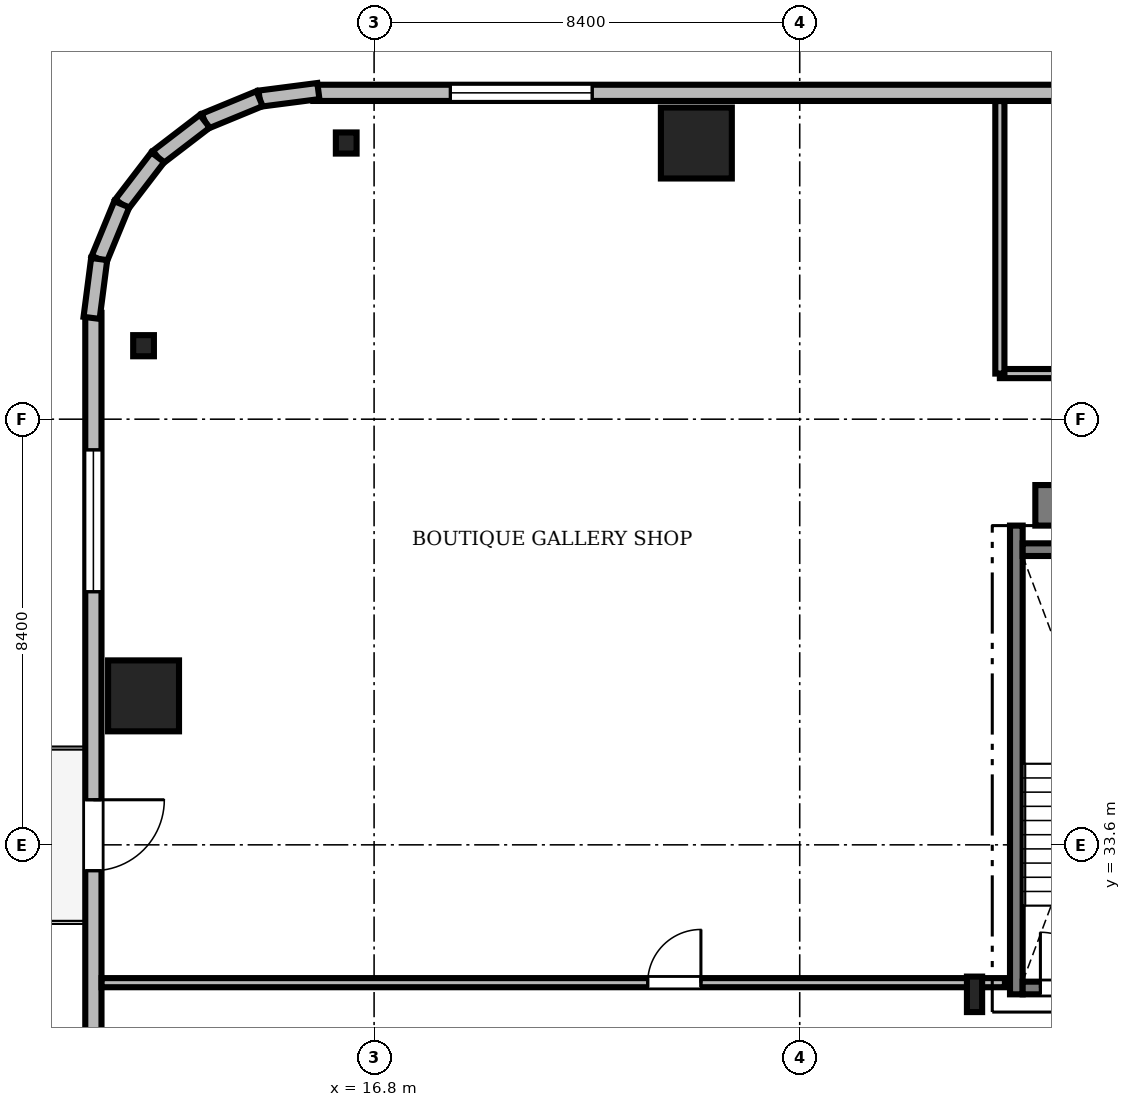
"""IFC4 building model, lengths in metres.
Left out: names, types, materials, properties, quantities, classifications, styles, units other than length and angle.
Written with IfcOpenShell. Run it as: python <this file> out.ifc"""

import sys

from ifc_helpers import new_model, si_unit, direction, frame, frame_2d, origin, origin_2d, place, context, subcontext, project, spatial, rectangle, i_section, extrude, source, transform, mapped, element, fill, save


model = new_model("IFC4")
c1 = context("Model", 3, precision=1e-05, world=origin(), true_north=direction((0.0, 1.0)))
c2 = subcontext(c1, "Body", "Model", "MODEL_VIEW")
j1 = project(units=[si_unit("LENGTHUNIT", "METRE"), si_unit("PLANEANGLEUNIT", "RADIAN")], contexts=[c1])
p1 = place(None, origin())
s1 = spatial("IfcSite", under=j1, at=p1, CompositionType="ELEMENT")
p2 = place(p1, origin())
s2 = spatial("IfcBuilding", under=s1, at=p2, CompositionType="ELEMENT")
p3 = place(p2, frame((0.0, 0.0, 226.05)))
s3 = spatial("IfcBuildingStorey", under=s2, at=p3, CompositionType="ELEMENT", Elevation=226.05)
m1 = source(origin(), c2, "Body", "SweptSolid", [
    extrude(rectangle(XDim=17.52, YDim=0.8, at=frame_2d((8.76, 0.0))), origin(), (0.0, 0.0, 1.0), 3.53),
])
p4 = place(p3, frame((29.85, 40.3, 0.0), z_axis=(0.0, 0.0, 1.0), x_axis=(1.0, 0.0, 0.0)))
e1 = element("IfcWall", 1, at=p4, inside=s3, PredefinedType="SHEAR", context=c2, shape_type="MappedRepresentation", body=[
    mapped(m1, transform((0.0, 0.0, 0.0), scale=1.0)),
])
m2 = source(origin(), c2, "Body", "SweptSolid", [
    extrude(i_section(OverallWidth=0.3, OverallDepth=0.7, WebThickness=0.017, FlangeThickness=0.032, FilletRadius=0.027, at=origin_2d()), origin(), (0.0, 0.0, 1.0), 3.53),
])
p5 = place(p3, frame((28.65, 30.65, 0.0), z_axis=(0.0, 0.0, 1.0), x_axis=(1.0, 0.0, 0.0)))
e2 = element("IfcColumn", 2, at=p5, inside=s3, PredefinedType="COLUMN", context=c2, shape_type="MappedRepresentation", body=[
    mapped(m2, transform((0.0, 0.0, 0.0), scale=1.0)),
])
m3 = source(origin(), c2, "Body", "SweptSolid", [
    extrude(rectangle(XDim=1.4, YDim=1.4, at=origin_2d()), origin(), (0.0, 0.0, 1.0), 3.53),
])
for number, where, z_axis, x_axis in (
    (3, (23.16, 47.45, 0.0), (0.0, 0.0, 1.0), (1.0, 0.0, 0.0)),
    (4, (12.25, 36.54, 0.0), (0.0, 0.0, 1.0), (1.0, 0.0, 0.0)),
):
    element("IfcColumn", number, at=place(p3, frame(where, z_axis=z_axis, x_axis=x_axis)), inside=s3, PredefinedType="COLUMN", context=c2, shape_type="MappedRepresentation", body=[
        mapped(m3, transform((0.0, 0.0, 0.0), scale=1.0)),
    ])
m4 = source(origin(), c2, "Body", "SweptSolid", [
    extrude(i_section(OverallWidth=0.409, OverallDepth=0.417, WebThickness=0.021, FlangeThickness=0.033, FilletRadius=0.015, at=origin_2d()), origin(), (0.0, 0.0, 1.0), 3.53),
])
for number, where, z_axis, x_axis in (
    (5, (16.25, 47.45, 0.0), (0.0, 0.0, 1.0), (1.0, 0.0, 0.0)),
    (6, (12.25, 43.45, 0.0), (0.0, 0.0, 1.0), (1.0, 0.0, 0.0)),
):
    element("IfcColumn", number, at=place(p3, frame(where, z_axis=z_axis, x_axis=x_axis)), inside=s3, PredefinedType="COLUMN", context=c2, shape_type="MappedRepresentation", body=[
        mapped(m4, transform((0.0, 0.0, 0.0), scale=1.0)),
    ])
m5 = source(origin(), c2, "Body", "SweptSolid", [
    extrude(rectangle(XDim=15.6, YDim=0.32, at=frame_2d((7.8, 0.0))), origin(), (0.0, 0.0, 1.0), 3.53),
])
p6 = place(p3, frame((31.2, 48.44, 0.0), z_axis=(0.0, 0.0, 1.0), x_axis=(-1.0, 0.0, 0.0)))
e7 = element("IfcWall", 7, at=p6, inside=s3, PredefinedType="SOLIDWALL", context=c2, shape_type="MappedRepresentation", body=[
    mapped(m5, transform((0.0, 0.0, 0.0), scale=1.0)),
])
m6 = source(origin(), c2, "Body", "SweptSolid", [
    extrude(rectangle(XDim=2.8, YDim=2.4, at=frame_2d((1.4, 1.2))), frame((0.0, 0.17, 0.0), z_axis=(0.0, -1.0, 0.0), x_axis=(1.0, 0.0, 0.0)), (0.0, 0.0, 1.0), 0.34),
])
p7 = place(p6, frame((10.095, 0.0, 0.72)))
e8 = element("IfcOpeningElement", 8, at=p7, cuts=e7, PredefinedType="OPENING", context=c2, shape_type="MappedRepresentation", body=[
    mapped(m6, transform((0.0, 0.0, 0.0), scale=1.0)),
])
m7 = source(origin(), c2, "Body", "SweptSolid", [
    extrude(rectangle(XDim=15.6, YDim=0.32, at=frame_2d((7.8, 0.0))), origin(), (0.0, 0.0, 1.0), 3.53),
])
p8 = place(p3, frame((11.26, 44.1, 0.0), z_axis=(0.0, 0.0, 1.0), x_axis=(0.0, -1.0, 0.0)))
e9 = element("IfcWall", 9, at=p8, inside=s3, PredefinedType="SOLIDWALL", context=c2, shape_type="MappedRepresentation", body=[
    mapped(m7, transform((0.0, 0.0, 0.0), scale=1.0)),
])
m8 = source(origin(), c2, "Body", "SweptSolid", [
    extrude(rectangle(XDim=1.4, YDim=2.3, at=frame_2d((0.7, 1.15))), frame((0.0, 0.17, 0.0), z_axis=(0.0, -1.0, 0.0), x_axis=(1.0, 0.0, 0.0)), (0.0, 0.0, 1.0), 0.34),
])
p9 = place(p8, frame((9.61, 0.0, 0.0)))
e10 = element("IfcOpeningElement", 10, at=p9, cuts=e9, PredefinedType="OPENING", context=c2, shape_type="MappedRepresentation", body=[
    mapped(m8, transform((0.0, 0.0, 0.0), scale=1.0)),
])
p10 = place(p8, frame((2.705, 0.0, 0.72)))
e11 = element("IfcOpeningElement", 11, at=p10, cuts=e9, PredefinedType="OPENING", context=c2, shape_type="MappedRepresentation", body=[
    mapped(m6, transform((0.0, 0.0, 0.0), scale=1.0)),
])
m9 = source(origin(), c2, "Body", "SweptSolid", [
    extrude(rectangle(XDim=1.17, YDim=0.32, at=frame_2d((0.585, 0.0))), origin(), (0.0, 0.0, 1.0), 3.53),
])
p11 = place(p3, frame((15.7, 48.476, 0.0), z_axis=(0.0, 0.0, 1.0), x_axis=(-0.991735963317, -0.128295670475, 0.0)))
e12 = element("IfcWall", 12, at=p11, inside=s3, PredefinedType="SOLIDWALL", context=c2, shape_type="MappedRepresentation", body=[
    mapped(m9, transform((0.0, 0.0, 0.0), scale=1.0)),
])
m10 = source(origin(), c2, "Body", "SweptSolid", [
    extrude(rectangle(XDim=1.169, YDim=0.32, at=frame_2d((0.584, 0.0))), origin(), (0.0, 0.0, 1.0), 3.53),
])
p12 = place(p3, frame((14.54, 48.325, 0.0), z_axis=(0.0, 0.0, 1.0), x_axis=(-0.924552646638, -0.381054331552, 0.0)))
e13 = element("IfcWall", 13, at=p12, inside=s3, PredefinedType="SOLIDWALL", context=c2, shape_type="MappedRepresentation", body=[
    mapped(m10, transform((0.0, 0.0, 0.0), scale=1.0)),
])
m11 = source(origin(), c2, "Body", "SweptSolid", [
    extrude(rectangle(XDim=1.169, YDim=0.32, at=frame_2d((0.584, 0.0))), origin(), (0.0, 0.0, 1.0), 3.53),
])
p13 = place(p3, frame((13.459, 47.88, 0.0), z_axis=(0.0, 0.0, 1.0), x_axis=(-0.793663520347, -0.608356981114, 0.0)))
e14 = element("IfcWall", 14, at=p13, inside=s3, PredefinedType="SOLIDWALL", context=c2, shape_type="MappedRepresentation", body=[
    mapped(m11, transform((0.0, 0.0, 0.0), scale=1.0)),
])
m12 = source(origin(), c2, "Body", "SweptSolid", [
    extrude(rectangle(XDim=1.169, YDim=0.32, at=frame_2d((0.584, 0.0))), origin(), (0.0, 0.0, 1.0), 3.53),
])
p14 = place(p3, frame((12.531, 47.169, 0.0), z_axis=(0.0, 0.0, 1.0), x_axis=(-0.608387696831, -0.793639975269, 0.0)))
e15 = element("IfcWall", 15, at=p14, inside=s3, PredefinedType="SOLIDWALL", context=c2, shape_type="MappedRepresentation", body=[
    mapped(m12, transform((0.0, 0.0, 0.0), scale=1.0)),
])
p15 = place(p3, frame((11.82, 46.241, 0.0), z_axis=(0.0, 0.0, 1.0), x_axis=(-0.381054331552, -0.924552646638, 0.0)))
e16 = element("IfcWall", 16, at=p15, inside=s3, PredefinedType="SOLIDWALL", context=c2, shape_type="MappedRepresentation", body=[
    mapped(m10, transform((0.0, 0.0, 0.0), scale=1.0)),
])
p16 = place(p3, frame((11.375, 45.16, 0.0), z_axis=(0.0, 0.0, 1.0), x_axis=(-0.128295670475, -0.991735963317, 0.0)))
e17 = element("IfcWall", 17, at=p16, inside=s3, PredefinedType="SOLIDWALL", context=c2, shape_type="MappedRepresentation", body=[
    mapped(m9, transform((0.0, 0.0, 0.0), scale=1.0)),
])
m13 = source(origin(), c2, "Body", "SweptSolid", [
    extrude(rectangle(XDim=9.25, YDim=0.25, at=frame_2d((4.625, 0.0))), origin(), (0.0, 0.0, 1.0), 3.55),
])
p17 = place(p3, frame((29.475, 30.65, 0.0), z_axis=(0.0, 0.0, 1.0), x_axis=(0.0, 1.0, 0.0)))
e18 = element("IfcWall", 18, at=p17, inside=s3, PredefinedType="SOLIDWALL", context=c2, shape_type="MappedRepresentation", body=[
    mapped(m13, transform((0.0, 0.0, 0.0), scale=1.0)),
])
m14 = source(origin(), c2, "Body", "SweptSolid", [
    extrude(rectangle(XDim=3.15, YDim=0.25, at=frame_2d((1.575, 0.0))), origin(), (0.0, 0.0, 1.0), 3.55),
])
p18 = place(p3, frame((29.6, 39.425, 0.0), z_axis=(0.0, 0.0, 1.0), x_axis=(1.0, 0.0, 0.0)))
e19 = element("IfcWall", 19, at=p18, inside=s3, PredefinedType="SOLIDWALL", context=c2, shape_type="MappedRepresentation", body=[
    mapped(m14, transform((0.0, 0.0, 0.0), scale=1.0)),
])
p19 = place(p3, frame((29.6, 30.775, 0.0), z_axis=(0.0, 0.0, 1.0), x_axis=(1.0, 0.0, 0.0)))
e20 = element("IfcWall", 20, at=p19, inside=s3, PredefinedType="SOLIDWALL", context=c2, shape_type="MappedRepresentation", body=[
    mapped(m14, transform((0.0, 0.0, 0.0), scale=1.0)),
])
m15 = source(origin(), c2, "Body", "SweptSolid", [
    extrude(rectangle(XDim=1.1, YDim=2.2, at=frame_2d((0.55, 1.1))), frame((0.0, 0.135, 0.0), z_axis=(0.0, -1.0, 0.0), x_axis=(1.0, 0.0, 0.0)), (0.0, 0.0, 1.0), 0.27),
])
p20 = place(p19, frame((0.35, 0.0, 0.0)))
e21 = element("IfcOpeningElement", 21, at=p20, cuts=e20, PredefinedType="OPENING", context=c2, shape_type="MappedRepresentation", body=[
    mapped(m15, transform((0.0, 0.0, 0.0), scale=1.0)),
])
m16 = source(origin(), c2, "Body", "SweptSolid", [
    extrude(rectangle(XDim=28.428, YDim=0.18, at=frame_2d((14.214, 0.0))), origin(), (0.0, 0.0, 1.0), 2.772),
])
p21 = place(p3, frame((29.15, 42.9, 0.0), z_axis=(0.0, 0.0, 1.0), x_axis=(1.0, 0.0, 0.0)))
e22 = element("IfcWall", 22, at=p21, inside=s3, PredefinedType="PARTITIONING", context=c2, shape_type="MappedRepresentation", body=[
    mapped(m16, transform((0.0, 0.0, 0.0), scale=1.0)),
])
m17 = source(origin(), c2, "Body", "SweptSolid", [
    extrude(rectangle(XDim=1.05, YDim=2.2, at=frame_2d((0.525, 1.1))), frame((0.0, 0.1, 0.0), z_axis=(0.0, -1.0, 0.0), x_axis=(1.0, 0.0, 0.0)), (0.0, 0.0, 1.0), 0.2),
])
p22 = place(p21, frame((4.5, 0.0, 0.0)))
e23 = element("IfcOpeningElement", 23, at=p22, cuts=e22, PredefinedType="OPENING", context=c2, shape_type="MappedRepresentation", body=[
    mapped(m17, transform((0.0, 0.0, 0.0), scale=1.0)),
])
m18 = source(origin(), c2, "Body", "SweptSolid", [
    extrude(rectangle(XDim=17.828, YDim=0.18, at=frame_2d((8.914, 0.0))), origin(), (0.0, 0.0, 1.0), 2.772),
])
p23 = place(p3, frame((11.422, 30.88, 0.0), z_axis=(0.0, 0.0, 1.0), x_axis=(1.0, 0.0, 0.0)))
e24 = element("IfcWall", 24, at=p23, inside=s3, PredefinedType="PARTITIONING", context=c2, shape_type="MappedRepresentation", body=[
    mapped(m18, transform((0.0, 0.0, 0.0), scale=1.0)),
])
p24 = place(p23, frame((10.778, 0.0, 0.0)))
e25 = element("IfcOpeningElement", 25, at=p24, cuts=e24, PredefinedType="OPENING", context=c2, shape_type="MappedRepresentation", body=[
    mapped(m17, transform((0.0, 0.0, 0.0), scale=1.0)),
])
m19 = source(origin(), c2, "Body", "SweptSolid", [
    extrude(rectangle(XDim=5.378, YDim=0.18, at=frame_2d((2.689, 0.0))), origin(), (0.0, 0.0, 1.0), 2.772),
])
p25 = place(p3, frame((29.15, 42.9, 0.0), z_axis=(0.0, 0.0, 1.0), x_axis=(0.0, 1.0, 0.0)))
e26 = element("IfcWall", 26, at=p25, inside=s3, PredefinedType="PARTITIONING", context=c2, shape_type="MappedRepresentation", body=[
    mapped(m19, transform((0.0, 0.0, 0.0), scale=1.0)),
])
m20 = source(origin(), c2, "Body", "SweptSolid", [
    extrude(rectangle(XDim=2.8, YDim=2.4, at=frame_2d((1.4, 1.2))), frame((0.0, 0.03, 0.0), z_axis=(0.0, -1.0, 0.0), x_axis=(1.0, 0.0, 0.0)), (0.0, 0.0, 1.0), 0.06),
])
p26 = place(p7, origin())
e27 = element("IfcWindow", 27, at=p26, inside=s3, PartitioningType="SINGLE_PANEL", PredefinedType="WINDOW", context=c2, shape_type="MappedRepresentation", body=[
    mapped(m20, transform((0.0, 0.0, 0.0), scale=1.0)),
])
fill(e8, e27)
m21 = source(origin(), c2, "Body", "SweptSolid", [
    extrude(rectangle(XDim=1.4, YDim=2.3, at=frame_2d((0.7, 1.15))), frame((0.0, 0.025, 0.0), z_axis=(0.0, -1.0, 0.0), x_axis=(1.0, 0.0, 0.0)), (0.0, 0.0, 1.0), 0.05),
])
p27 = place(p9, frame((1.4, 0.0, 0.0), z_axis=(0.0, 0.0, 1.0), x_axis=(-1.0, 0.0, 0.0)))
e28 = element("IfcDoor", 28, at=p27, inside=s3, OperationType="DOUBLE_DOOR_SLIDING", PredefinedType="DOOR", context=c2, shape_type="MappedRepresentation", body=[
    mapped(m21, transform((0.0, 0.0, 0.0), scale=1.0)),
])
fill(e10, e28)
p28 = place(p10, origin())
e29 = element("IfcWindow", 29, at=p28, inside=s3, PartitioningType="SINGLE_PANEL", PredefinedType="WINDOW", context=c2, shape_type="MappedRepresentation", body=[
    mapped(m20, transform((0.0, 0.0, 0.0), scale=1.0)),
])
fill(e11, e29)
m22 = source(origin(), c2, "Body", "SweptSolid", [
    extrude(rectangle(XDim=1.1, YDim=2.2, at=frame_2d((0.55, 1.1))), frame((0.0, 0.025, 0.0), z_axis=(0.0, -1.0, 0.0), x_axis=(1.0, 0.0, 0.0)), (0.0, 0.0, 1.0), 0.05),
])
p29 = place(p20, origin())
e30 = element("IfcDoor", 30, at=p29, inside=s3, OperationType="SINGLE_SWING_LEFT", PredefinedType="DOOR", context=c2, shape_type="MappedRepresentation", body=[
    mapped(m22, transform((0.0, 0.0, 0.0), scale=1.0)),
])
fill(e21, e30)
m23 = source(origin(), c2, "Body", "SweptSolid", [
    extrude(rectangle(XDim=1.05, YDim=2.2, at=frame_2d((0.525, 1.1))), frame((0.0, 0.025, 0.0), z_axis=(0.0, -1.0, 0.0), x_axis=(1.0, 0.0, 0.0)), (0.0, 0.0, 1.0), 0.05),
])
p30 = place(p24, origin())
e31 = element("IfcDoor", 31, at=p30, inside=s3, OperationType="SINGLE_SWING_RIGHT", PredefinedType="DOOR", context=c2, shape_type="MappedRepresentation", body=[
    mapped(m23, transform((0.0, 0.0, 0.0), scale=1.0)),
])
fill(e25, e31)
save(model, sys.argv[1])
